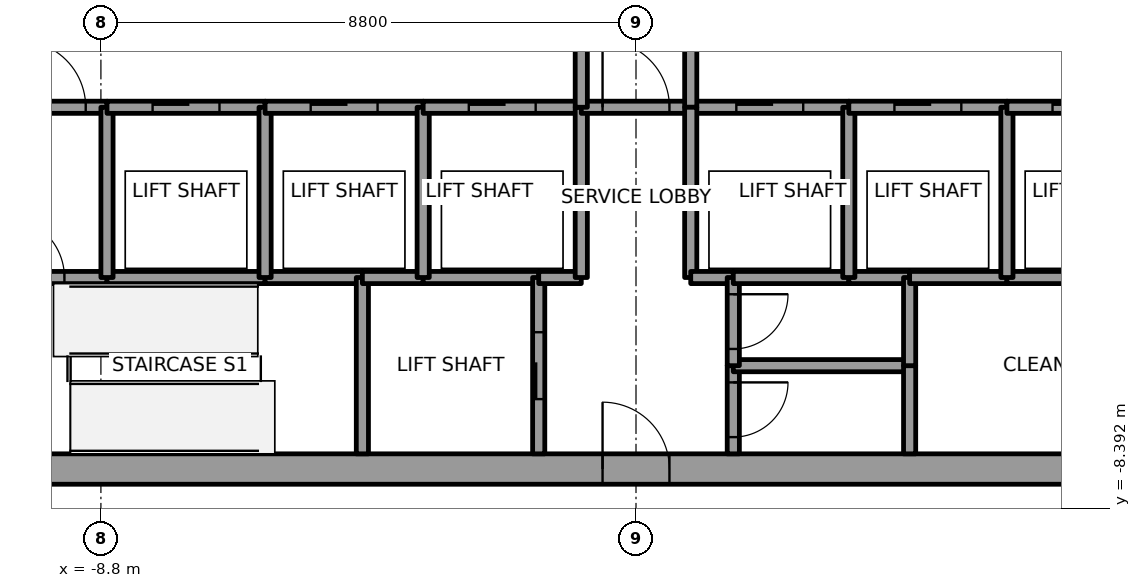
"""IFC4 building model, lengths in metres.
Left out: names, types, materials, properties, quantities, classifications, styles, units other than length and angle.
Written with IfcOpenShell. Run it as: python <this file> out.ifc"""

import sys

from ifc_helpers import new_model, si_unit, direction, frame, frame_2d, origin, place, context, subcontext, project, spatial, rectangle, extrude, element, fill, save


model = new_model("IFC4")
c1 = context("Model", 3, precision=1e-05, world=origin(), true_north=direction((0.0, 1.0)))
c2 = subcontext(c1, "Body", "Model", "MODEL_VIEW")
j1 = project(units=[si_unit("LENGTHUNIT", "METRE"), si_unit("PLANEANGLEUNIT", "RADIAN")], contexts=[c1])
p1 = place(None, origin())
s1 = spatial("IfcSite", under=j1, at=p1, CompositionType="ELEMENT")
p2 = place(p1, origin())
s2 = spatial("IfcBuilding", under=s1, at=p2, CompositionType="ELEMENT")
p3 = place(p2, frame((0.0, 0.0, 291.0)))
s3 = spatial("IfcBuildingStorey", under=s2, at=p3, CompositionType="ELEMENT", Elevation=291.0)
p4 = place(p3, frame((-11.0, -7.75, 0.0), z_axis=(0.0, 0.0, 1.0), x_axis=(1.0, 0.0, 0.0)))
e1 = element("IfcWall", 1, at=p4, inside=s3, PredefinedType="SHEAR", context=c2, shape_type="SweptSolid", body=[
    extrude(rectangle(XDim=22.0, YDim=0.5, at=frame_2d((11.0, 0.0))), origin(), (0.0, 0.0, 1.0), 4.0),
])
p5 = place(p4, frame((10.45, 0.0, 0.0)))
e2 = element("IfcOpeningElement", 2, at=p5, cuts=e1, PredefinedType="OPENING", context=c2, shape_type="SweptSolid", body=[
    extrude(rectangle(XDim=1.1, YDim=2.1, at=frame_2d((0.55, 1.05))), frame((0.0, 0.25, 0.0), z_axis=(0.0, -1.0, 0.0), x_axis=(1.0, 0.0, 0.0)), (0.0, 0.0, 1.0), 0.5),
])
p6 = place(p3, frame((-10.5, -4.6, 0.0), z_axis=(0.0, 0.0, 1.0), x_axis=(1.0, 0.0, 0.0)))
e3 = element("IfcWall", 3, at=p6, inside=s3, PredefinedType="SOLIDWALL", context=c2, shape_type="SweptSolid", body=[
    extrude(rectangle(XDim=1.8, YDim=0.2, at=frame_2d((0.9, 0.0))), origin(), (0.0, 0.0, 1.0), 3.85),
])
p7 = place(p6, frame((0.1, 0.0, 0.0)))
e4 = element("IfcOpeningElement", 4, at=p7, cuts=e3, PredefinedType="OPENING", context=c2, shape_type="SweptSolid", body=[
    extrude(rectangle(XDim=1.0, YDim=2.1, at=frame_2d((0.5, 1.05))), frame((0.0, 0.1, 0.0), z_axis=(0.0, -1.0, 0.0), x_axis=(1.0, 0.0, 0.0)), (0.0, 0.0, 1.0), 0.2),
])
p8 = place(p3, frame((-10.5, -1.8, 0.0), z_axis=(0.0, 0.0, 1.0), x_axis=(1.0, 0.0, 0.0)))
e5 = element("IfcWall", 5, at=p8, inside=s3, PredefinedType="SOLIDWALL", context=c2, shape_type="SweptSolid", body=[
    extrude(rectangle(XDim=1.8, YDim=0.2, at=frame_2d((0.9, 0.0))), origin(), (0.0, 0.0, 1.0), 3.85),
])
p9 = place(p8, frame((0.35, 0.0, 0.0)))
e6 = element("IfcOpeningElement", 6, at=p9, cuts=e5, PredefinedType="OPENING", context=c2, shape_type="SweptSolid", body=[
    extrude(rectangle(XDim=1.1, YDim=2.1, at=frame_2d((0.55, 1.05))), frame((0.0, 0.1, 0.0), z_axis=(0.0, -1.0, 0.0), x_axis=(1.0, 0.0, 0.0)), (0.0, 0.0, 1.0), 0.2),
])
p10 = place(p3, frame((-8.7, -4.6, 0.0), z_axis=(0.0, 0.0, 1.0), x_axis=(1.0, 0.0, 0.0)))
e7 = element("IfcWall", 7, at=p10, inside=s3, PredefinedType="SOLIDWALL", context=c2, shape_type="SweptSolid", body=[
    extrude(rectangle(XDim=2.6, YDim=0.2, at=frame_2d((1.3, 0.0))), origin(), (0.0, 0.0, 1.0), 3.85),
])
p11 = place(p3, frame((-8.7, -4.6, 0.0), z_axis=(0.0, 0.0, 1.0), x_axis=(0.0, 1.0, 0.0)))
e8 = element("IfcWall", 8, at=p11, inside=s3, PredefinedType="SOLIDWALL", context=c2, shape_type="SweptSolid", body=[
    extrude(rectangle(XDim=2.8, YDim=0.2, at=frame_2d((1.4, 0.0))), origin(), (0.0, 0.0, 1.0), 3.85),
])
p12 = place(p3, frame((-8.7, -1.8, 0.0), z_axis=(0.0, 0.0, 1.0), x_axis=(1.0, 0.0, 0.0)))
e9 = element("IfcWall", 9, at=p12, inside=s3, PredefinedType="SOLIDWALL", context=c2, shape_type="SweptSolid", body=[
    extrude(rectangle(XDim=2.6, YDim=0.2, at=frame_2d((1.3, 0.0))), origin(), (0.0, 0.0, 1.0), 3.85),
])
p13 = place(p12, frame((0.75, 0.0, 0.0)))
e10 = element("IfcOpeningElement", 10, at=p13, cuts=e9, PredefinedType="OPENING", context=c2, shape_type="SweptSolid", body=[
    extrude(rectangle(XDim=1.1, YDim=2.1, at=frame_2d((0.55, 1.05))), frame((0.0, 0.1, 0.0), z_axis=(0.0, -1.0, 0.0), x_axis=(1.0, 0.0, 0.0)), (0.0, 0.0, 1.0), 0.2),
])
p14 = place(p3, frame((-6.1, -4.6, 0.0), z_axis=(0.0, 0.0, 1.0), x_axis=(1.0, 0.0, 0.0)))
e11 = element("IfcWall", 11, at=p14, inside=s3, PredefinedType="SOLIDWALL", context=c2, shape_type="SweptSolid", body=[
    extrude(rectangle(XDim=1.6, YDim=0.2, at=frame_2d((0.8, 0.0))), origin(), (0.0, 0.0, 1.0), 3.85),
])
p15 = place(p3, frame((-6.1, -4.6, 0.0), z_axis=(0.0, 0.0, 1.0), x_axis=(0.0, 1.0, 0.0)))
e12 = element("IfcWall", 12, at=p15, inside=s3, PredefinedType="SOLIDWALL", context=c2, shape_type="SweptSolid", body=[
    extrude(rectangle(XDim=2.8, YDim=0.2, at=frame_2d((1.4, 0.0))), origin(), (0.0, 0.0, 1.0), 3.85),
])
p16 = place(p3, frame((-6.1, -1.8, 0.0), z_axis=(0.0, 0.0, 1.0), x_axis=(1.0, 0.0, 0.0)))
e13 = element("IfcWall", 13, at=p16, inside=s3, PredefinedType="SOLIDWALL", context=c2, shape_type="SweptSolid", body=[
    extrude(rectangle(XDim=2.6, YDim=0.2, at=frame_2d((1.3, 0.0))), origin(), (0.0, 0.0, 1.0), 3.85),
])
p17 = place(p16, frame((0.75, 0.0, 0.0)))
e14 = element("IfcOpeningElement", 14, at=p17, cuts=e13, PredefinedType="OPENING", context=c2, shape_type="SweptSolid", body=[
    extrude(rectangle(XDim=1.1, YDim=2.1, at=frame_2d((0.55, 1.05))), frame((0.0, 0.1, 0.0), z_axis=(0.0, -1.0, 0.0), x_axis=(1.0, 0.0, 0.0)), (0.0, 0.0, 1.0), 0.2),
])
p18 = place(p3, frame((-4.5, -4.6, 0.0), z_axis=(0.0, 0.0, 1.0), x_axis=(0.0, -1.0, 0.0)))
e15 = element("IfcWall", 15, at=p18, inside=s3, PredefinedType="SOLIDWALL", context=c2, shape_type="SweptSolid", body=[
    extrude(rectangle(XDim=2.9, YDim=0.2, at=frame_2d((1.45, 0.0))), origin(), (0.0, 0.0, 1.0), 3.85),
])
p19 = place(p3, frame((-4.5, -4.6, 0.0), z_axis=(0.0, 0.0, 1.0), x_axis=(1.0, 0.0, 0.0)))
e16 = element("IfcWall", 16, at=p19, inside=s3, PredefinedType="SOLIDWALL", context=c2, shape_type="SweptSolid", body=[
    extrude(rectangle(XDim=1.0, YDim=0.2, at=frame_2d((0.5, 0.0))), origin(), (0.0, 0.0, 1.0), 3.85),
])
p20 = place(p3, frame((-3.5, -4.6, 0.0), z_axis=(0.0, 0.0, 1.0), x_axis=(1.0, 0.0, 0.0)))
e17 = element("IfcWall", 17, at=p20, inside=s3, PredefinedType="SOLIDWALL", context=c2, shape_type="SweptSolid", body=[
    extrude(rectangle(XDim=1.9, YDim=0.2, at=frame_2d((0.95, 0.0))), origin(), (0.0, 0.0, 1.0), 3.85),
])
p21 = place(p3, frame((-3.5, -4.6, 0.0), z_axis=(0.0, 0.0, 1.0), x_axis=(0.0, 1.0, 0.0)))
e18 = element("IfcWall", 18, at=p21, inside=s3, PredefinedType="SOLIDWALL", context=c2, shape_type="SweptSolid", body=[
    extrude(rectangle(XDim=2.8, YDim=0.2, at=frame_2d((1.4, 0.0))), origin(), (0.0, 0.0, 1.0), 3.85),
])
p22 = place(p3, frame((-3.5, -1.8, 0.0), z_axis=(0.0, 0.0, 1.0), x_axis=(1.0, 0.0, 0.0)))
e19 = element("IfcWall", 19, at=p22, inside=s3, PredefinedType="SOLIDWALL", context=c2, shape_type="SweptSolid", body=[
    extrude(rectangle(XDim=2.6, YDim=0.2, at=frame_2d((1.3, 0.0))), origin(), (0.0, 0.0, 1.0), 3.85),
])
p23 = place(p22, frame((0.75, 0.0, 0.0)))
e20 = element("IfcOpeningElement", 20, at=p23, cuts=e19, PredefinedType="OPENING", context=c2, shape_type="SweptSolid", body=[
    extrude(rectangle(XDim=1.1, YDim=2.1, at=frame_2d((0.55, 1.05))), frame((0.0, 0.1, 0.0), z_axis=(0.0, -1.0, 0.0), x_axis=(1.0, 0.0, 0.0)), (0.0, 0.0, 1.0), 0.2),
])
p24 = place(p3, frame((-1.6, -7.5, 0.0), z_axis=(0.0, 0.0, 1.0), x_axis=(0.0, 1.0, 0.0)))
e21 = element("IfcWall", 21, at=p24, inside=s3, PredefinedType="SOLIDWALL", context=c2, shape_type="SweptSolid", body=[
    extrude(rectangle(XDim=2.9, YDim=0.2, at=frame_2d((1.45, 0.0))), origin(), (0.0, 0.0, 1.0), 3.85),
])
p25 = place(p24, frame((0.9, 0.0, 0.0)))
e22 = element("IfcOpeningElement", 22, at=p25, cuts=e21, PredefinedType="OPENING", context=c2, shape_type="SweptSolid", body=[
    extrude(rectangle(XDim=1.1, YDim=2.1, at=frame_2d((0.55, 1.05))), frame((0.0, 0.1, 0.0), z_axis=(0.0, -1.0, 0.0), x_axis=(1.0, 0.0, 0.0)), (0.0, 0.0, 1.0), 0.2),
])
p26 = place(p3, frame((-1.6, -4.6, 0.0), z_axis=(0.0, 0.0, 1.0), x_axis=(1.0, 0.0, 0.0)))
e23 = element("IfcWall", 23, at=p26, inside=s3, PredefinedType="SOLIDWALL", context=c2, shape_type="SweptSolid", body=[
    extrude(rectangle(XDim=0.7, YDim=0.2, at=frame_2d((0.35, 0.0))), origin(), (0.0, 0.0, 1.0), 3.85),
])
p27 = place(p3, frame((-0.9, -4.6, 0.0), z_axis=(0.0, 0.0, 1.0), x_axis=(0.0, 1.0, 0.0)))
e24 = element("IfcWall", 24, at=p27, inside=s3, PredefinedType="SOLIDWALL", context=c2, shape_type="SweptSolid", body=[
    extrude(rectangle(XDim=2.8, YDim=0.2, at=frame_2d((1.4, 0.0))), origin(), (0.0, 0.0, 1.0), 3.85),
])
p28 = place(p3, frame((-0.9, -1.8, 0.0), z_axis=(0.0, 0.0, 1.0), x_axis=(1.0, 0.0, 0.0)))
e25 = element("IfcWall", 25, at=p28, inside=s3, PredefinedType="SOLIDWALL", context=c2, shape_type="SweptSolid", body=[
    extrude(rectangle(XDim=1.8, YDim=0.2, at=frame_2d((0.9, 0.0))), origin(), (0.0, 0.0, 1.0), 3.85),
])
p29 = place(p28, frame((0.35, 0.0, 0.0)))
e26 = element("IfcOpeningElement", 26, at=p29, cuts=e25, PredefinedType="OPENING", context=c2, shape_type="SweptSolid", body=[
    extrude(rectangle(XDim=1.1, YDim=2.1, at=frame_2d((0.55, 1.05))), frame((0.0, 0.1, 0.0), z_axis=(0.0, -1.0, 0.0), x_axis=(1.0, 0.0, 0.0)), (0.0, 0.0, 1.0), 0.2),
])
p30 = place(p3, frame((-0.9, 1.8, 0.0), z_axis=(0.0, 0.0, 1.0), x_axis=(0.0, -1.0, 0.0)))
e27 = element("IfcWall", 27, at=p30, inside=s3, PredefinedType="SOLIDWALL", context=c2, shape_type="SweptSolid", body=[
    extrude(rectangle(XDim=3.6, YDim=0.2, at=frame_2d((1.8, 0.0))), origin(), (0.0, 0.0, 1.0), 3.85),
])
p31 = place(p30, frame((1.05, 0.0, 0.0)))
e28 = element("IfcOpeningElement", 28, at=p31, cuts=e27, PredefinedType="OPENING", context=c2, shape_type="SweptSolid", body=[
    extrude(rectangle(XDim=1.5, YDim=2.1, at=frame_2d((0.75, 1.05))), frame((0.0, 0.1, 0.0), z_axis=(0.0, -1.0, 0.0), x_axis=(1.0, 0.0, 0.0)), (0.0, 0.0, 1.0), 0.2),
])
p32 = place(p3, frame((0.9, -1.8, 0.0), z_axis=(0.0, 0.0, 1.0), x_axis=(1.0, 0.0, 0.0)))
e29 = element("IfcWall", 29, at=p32, inside=s3, PredefinedType="SOLIDWALL", context=c2, shape_type="SweptSolid", body=[
    extrude(rectangle(XDim=2.6, YDim=0.2, at=frame_2d((1.3, 0.0))), origin(), (0.0, 0.0, 1.0), 3.85),
])
p33 = place(p32, frame((0.75, 0.0, 0.0)))
e30 = element("IfcOpeningElement", 30, at=p33, cuts=e29, PredefinedType="OPENING", context=c2, shape_type="SweptSolid", body=[
    extrude(rectangle(XDim=1.1, YDim=2.1, at=frame_2d((0.55, 1.05))), frame((0.0, 0.1, 0.0), z_axis=(0.0, -1.0, 0.0), x_axis=(1.0, 0.0, 0.0)), (0.0, 0.0, 1.0), 0.2),
])
p34 = place(p3, frame((0.9, -1.8, 0.0), z_axis=(0.0, 0.0, 1.0), x_axis=(0.0, 1.0, 0.0)))
e31 = element("IfcWall", 31, at=p34, inside=s3, PredefinedType="SOLIDWALL", context=c2, shape_type="SweptSolid", body=[
    extrude(rectangle(XDim=3.6, YDim=0.2, at=frame_2d((1.8, 0.0))), origin(), (0.0, 0.0, 1.0), 3.85),
])
p35 = place(p34, frame((1.05, 0.0, 0.0)))
e32 = element("IfcOpeningElement", 32, at=p35, cuts=e31, PredefinedType="OPENING", context=c2, shape_type="SweptSolid", body=[
    extrude(rectangle(XDim=1.5, YDim=2.1, at=frame_2d((0.75, 1.05))), frame((0.0, 0.1, 0.0), z_axis=(0.0, -1.0, 0.0), x_axis=(1.0, 0.0, 0.0)), (0.0, 0.0, 1.0), 0.2),
])
p36 = place(p3, frame((0.9, -1.8, 0.0), z_axis=(0.0, 0.0, 1.0), x_axis=(0.0, -1.0, 0.0)))
e33 = element("IfcWall", 33, at=p36, inside=s3, PredefinedType="SOLIDWALL", context=c2, shape_type="SweptSolid", body=[
    extrude(rectangle(XDim=2.8, YDim=0.2, at=frame_2d((1.4, 0.0))), origin(), (0.0, 0.0, 1.0), 3.85),
])
p37 = place(p3, frame((0.9, -4.6, 0.0), z_axis=(0.0, 0.0, 1.0), x_axis=(1.0, 0.0, 0.0)))
e34 = element("IfcWall", 34, at=p37, inside=s3, PredefinedType="SOLIDWALL", context=c2, shape_type="SweptSolid", body=[
    extrude(rectangle(XDim=0.7, YDim=0.2, at=frame_2d((0.35, 0.0))), origin(), (0.0, 0.0, 1.0), 3.85),
])
p38 = place(p3, frame((1.6, -6.05, 0.0), z_axis=(0.0, 0.0, 1.0), x_axis=(0.0, -1.0, 0.0)))
e35 = element("IfcWall", 35, at=p38, inside=s3, PredefinedType="SOLIDWALL", context=c2, shape_type="SweptSolid", body=[
    extrude(rectangle(XDim=1.45, YDim=0.2, at=frame_2d((0.725, 0.0))), origin(), (0.0, 0.0, 1.0), 3.85),
])
p39 = place(p38, frame((0.275, 0.0, 0.0)))
e36 = element("IfcOpeningElement", 36, at=p39, cuts=e35, PredefinedType="OPENING", context=c2, shape_type="SweptSolid", body=[
    extrude(rectangle(XDim=0.9, YDim=2.1, at=frame_2d((0.45, 1.05))), frame((0.0, 0.1, 0.0), z_axis=(0.0, -1.0, 0.0), x_axis=(1.0, 0.0, 0.0)), (0.0, 0.0, 1.0), 0.2),
])
p40 = place(p3, frame((4.5, -6.05, 0.0), z_axis=(0.0, 0.0, 1.0), x_axis=(-1.0, 0.0, 0.0)))
e37 = element("IfcWall", 37, at=p40, inside=s3, PredefinedType="SOLIDWALL", context=c2, shape_type="SweptSolid", body=[
    extrude(rectangle(XDim=2.9, YDim=0.2, at=frame_2d((1.45, 0.0))), origin(), (0.0, 0.0, 1.0), 3.85),
])
p41 = place(p3, frame((1.6, -4.6, 0.0), z_axis=(0.0, 0.0, 1.0), x_axis=(0.0, -1.0, 0.0)))
e38 = element("IfcWall", 38, at=p41, inside=s3, PredefinedType="SOLIDWALL", context=c2, shape_type="SweptSolid", body=[
    extrude(rectangle(XDim=1.45, YDim=0.2, at=frame_2d((0.725, 0.0))), origin(), (0.0, 0.0, 1.0), 3.85),
])
p42 = place(p41, frame((0.275, 0.0, 0.0)))
e39 = element("IfcOpeningElement", 39, at=p42, cuts=e38, PredefinedType="OPENING", context=c2, shape_type="SweptSolid", body=[
    extrude(rectangle(XDim=0.9, YDim=2.1, at=frame_2d((0.45, 1.05))), frame((0.0, 0.1, 0.0), z_axis=(0.0, -1.0, 0.0), x_axis=(1.0, 0.0, 0.0)), (0.0, 0.0, 1.0), 0.2),
])
p43 = place(p3, frame((3.5, -4.6, 0.0), z_axis=(0.0, 0.0, 1.0), x_axis=(-1.0, 0.0, 0.0)))
e40 = element("IfcWall", 40, at=p43, inside=s3, PredefinedType="SOLIDWALL", context=c2, shape_type="SweptSolid", body=[
    extrude(rectangle(XDim=1.9, YDim=0.2, at=frame_2d((0.95, 0.0))), origin(), (0.0, 0.0, 1.0), 3.85),
])
p44 = place(p3, frame((4.5, -4.6, 0.0), z_axis=(0.0, 0.0, 1.0), x_axis=(-1.0, 0.0, 0.0)))
e41 = element("IfcWall", 41, at=p44, inside=s3, PredefinedType="SOLIDWALL", context=c2, shape_type="SweptSolid", body=[
    extrude(rectangle(XDim=1.0, YDim=0.2, at=frame_2d((0.5, 0.0))), origin(), (0.0, 0.0, 1.0), 3.85),
])
p45 = place(p3, frame((3.5, -4.6, 0.0), z_axis=(0.0, 0.0, 1.0), x_axis=(0.0, 1.0, 0.0)))
e42 = element("IfcWall", 42, at=p45, inside=s3, PredefinedType="SOLIDWALL", context=c2, shape_type="SweptSolid", body=[
    extrude(rectangle(XDim=2.8, YDim=0.2, at=frame_2d((1.4, 0.0))), origin(), (0.0, 0.0, 1.0), 3.85),
])
p46 = place(p3, frame((3.5, -1.8, 0.0), z_axis=(0.0, 0.0, 1.0), x_axis=(1.0, 0.0, 0.0)))
e43 = element("IfcWall", 43, at=p46, inside=s3, PredefinedType="SOLIDWALL", context=c2, shape_type="SweptSolid", body=[
    extrude(rectangle(XDim=2.6, YDim=0.2, at=frame_2d((1.3, 0.0))), origin(), (0.0, 0.0, 1.0), 3.85),
])
p47 = place(p46, frame((0.75, 0.0, 0.0)))
e44 = element("IfcOpeningElement", 44, at=p47, cuts=e43, PredefinedType="OPENING", context=c2, shape_type="SweptSolid", body=[
    extrude(rectangle(XDim=1.1, YDim=2.1, at=frame_2d((0.55, 1.05))), frame((0.0, 0.1, 0.0), z_axis=(0.0, -1.0, 0.0), x_axis=(1.0, 0.0, 0.0)), (0.0, 0.0, 1.0), 0.2),
])
for number, where, z_axis, x_axis in (
    (45, (4.5, -6.05, 0.0), (0.0, 0.0, 1.0), (0.0, -1.0, 0.0)),
    (46, (4.5, -4.6, 0.0), (0.0, 0.0, 1.0), (0.0, -1.0, 0.0)),
):
    element("IfcWall", number, at=place(p3, frame(where, z_axis=z_axis, x_axis=x_axis)), inside=s3, PredefinedType="SOLIDWALL", context=c2, shape_type="SweptSolid", body=[
        extrude(rectangle(XDim=1.45, YDim=0.2, at=frame_2d((0.725, 0.0))), origin(), (0.0, 0.0, 1.0), 3.85),
    ])
p48 = place(p3, frame((6.1, -4.6, 0.0), z_axis=(0.0, 0.0, 1.0), x_axis=(-1.0, 0.0, 0.0)))
e47 = element("IfcWall", 47, at=p48, inside=s3, PredefinedType="SOLIDWALL", context=c2, shape_type="SweptSolid", body=[
    extrude(rectangle(XDim=1.6, YDim=0.2, at=frame_2d((0.8, 0.0))), origin(), (0.0, 0.0, 1.0), 3.85),
])
p49 = place(p3, frame((8.7, -4.6, 0.0), z_axis=(0.0, 0.0, 1.0), x_axis=(-1.0, 0.0, 0.0)))
e48 = element("IfcWall", 48, at=p49, inside=s3, PredefinedType="SOLIDWALL", context=c2, shape_type="SweptSolid", body=[
    extrude(rectangle(XDim=2.6, YDim=0.2, at=frame_2d((1.3, 0.0))), origin(), (0.0, 0.0, 1.0), 3.85),
])
p50 = place(p3, frame((6.1, -4.6, 0.0), z_axis=(0.0, 0.0, 1.0), x_axis=(0.0, 1.0, 0.0)))
e49 = element("IfcWall", 49, at=p50, inside=s3, PredefinedType="SOLIDWALL", context=c2, shape_type="SweptSolid", body=[
    extrude(rectangle(XDim=2.8, YDim=0.2, at=frame_2d((1.4, 0.0))), origin(), (0.0, 0.0, 1.0), 3.85),
])
p51 = place(p3, frame((6.1, -1.8, 0.0), z_axis=(0.0, 0.0, 1.0), x_axis=(1.0, 0.0, 0.0)))
e50 = element("IfcWall", 50, at=p51, inside=s3, PredefinedType="SOLIDWALL", context=c2, shape_type="SweptSolid", body=[
    extrude(rectangle(XDim=2.6, YDim=0.2, at=frame_2d((1.3, 0.0))), origin(), (0.0, 0.0, 1.0), 3.85),
])
p52 = place(p51, frame((0.75, 0.0, 0.0)))
e51 = element("IfcOpeningElement", 51, at=p52, cuts=e50, PredefinedType="OPENING", context=c2, shape_type="SweptSolid", body=[
    extrude(rectangle(XDim=1.1, YDim=2.1, at=frame_2d((0.55, 1.05))), frame((0.0, 0.1, 0.0), z_axis=(0.0, -1.0, 0.0), x_axis=(1.0, 0.0, 0.0)), (0.0, 0.0, 1.0), 0.2),
])
p53 = place(p13, origin())
e52 = element("IfcDoor", 52, at=p53, inside=s3, OperationType="SLIDING_TO_LEFT", PredefinedType="DOOR", context=c2, shape_type="SweptSolid", body=[
    extrude(rectangle(XDim=1.1, YDim=2.1, at=frame_2d((0.55, 1.05))), frame((0.0, 0.025, 0.0), z_axis=(0.0, -1.0, 0.0), x_axis=(1.0, 0.0, 0.0)), (0.0, 0.0, 1.0), 0.05),
])
fill(e10, e52)
p54 = place(p17, origin())
e53 = element("IfcDoor", 53, at=p54, inside=s3, OperationType="SLIDING_TO_RIGHT", PredefinedType="DOOR", context=c2, shape_type="SweptSolid", body=[
    extrude(rectangle(XDim=1.1, YDim=2.1, at=frame_2d((0.55, 1.05))), frame((0.0, 0.025, 0.0), z_axis=(0.0, -1.0, 0.0), x_axis=(1.0, 0.0, 0.0)), (0.0, 0.0, 1.0), 0.05),
])
fill(e14, e53)
p55 = place(p23, origin())
e54 = element("IfcDoor", 54, at=p55, inside=s3, OperationType="SLIDING_TO_RIGHT", PredefinedType="DOOR", context=c2, shape_type="SweptSolid", body=[
    extrude(rectangle(XDim=1.1, YDim=2.1, at=frame_2d((0.55, 1.05))), frame((0.0, 0.025, 0.0), z_axis=(0.0, -1.0, 0.0), x_axis=(1.0, 0.0, 0.0)), (0.0, 0.0, 1.0), 0.05),
])
fill(e20, e54)
p56 = place(p33, origin())
e55 = element("IfcDoor", 55, at=p56, inside=s3, OperationType="SLIDING_TO_LEFT", PredefinedType="DOOR", context=c2, shape_type="SweptSolid", body=[
    extrude(rectangle(XDim=1.1, YDim=2.1, at=frame_2d((0.55, 1.05))), frame((0.0, 0.025, 0.0), z_axis=(0.0, -1.0, 0.0), x_axis=(1.0, 0.0, 0.0)), (0.0, 0.0, 1.0), 0.05),
])
fill(e30, e55)
p57 = place(p47, origin())
e56 = element("IfcDoor", 56, at=p57, inside=s3, OperationType="SLIDING_TO_LEFT", PredefinedType="DOOR", context=c2, shape_type="SweptSolid", body=[
    extrude(rectangle(XDim=1.1, YDim=2.1, at=frame_2d((0.55, 1.05))), frame((0.0, 0.025, 0.0), z_axis=(0.0, -1.0, 0.0), x_axis=(1.0, 0.0, 0.0)), (0.0, 0.0, 1.0), 0.05),
])
fill(e44, e56)
p58 = place(p52, origin())
e57 = element("IfcDoor", 57, at=p58, inside=s3, OperationType="SLIDING_TO_LEFT", PredefinedType="DOOR", context=c2, shape_type="SweptSolid", body=[
    extrude(rectangle(XDim=1.1, YDim=2.1, at=frame_2d((0.55, 1.05))), frame((0.0, 0.025, 0.0), z_axis=(0.0, -1.0, 0.0), x_axis=(1.0, 0.0, 0.0)), (0.0, 0.0, 1.0), 0.05),
])
fill(e51, e57)
p59 = place(p25, origin())
e58 = element("IfcDoor", 58, at=p59, inside=s3, OperationType="SLIDING_TO_RIGHT", PredefinedType="DOOR", context=c2, shape_type="SweptSolid", body=[
    extrude(rectangle(XDim=1.1, YDim=2.1, at=frame_2d((0.55, 1.05))), frame((0.0, 0.025, 0.0), z_axis=(0.0, -1.0, 0.0), x_axis=(1.0, 0.0, 0.0)), (0.0, 0.0, 1.0), 0.05),
])
fill(e22, e58)
p60 = place(p9, origin())
e59 = element("IfcDoor", 59, at=p60, inside=s3, OperationType="SINGLE_SWING_LEFT", PredefinedType="DOOR", context=c2, shape_type="SweptSolid", body=[
    extrude(rectangle(XDim=1.1, YDim=2.1, at=frame_2d((0.55, 1.05))), frame((0.0, 0.025, 0.0), z_axis=(0.0, -1.0, 0.0), x_axis=(1.0, 0.0, 0.0)), (0.0, 0.0, 1.0), 0.05),
])
fill(e6, e59)
p61 = place(p29, origin())
e60 = element("IfcDoor", 60, at=p61, inside=s3, OperationType="SINGLE_SWING_RIGHT", PredefinedType="DOOR", context=c2, shape_type="SweptSolid", body=[
    extrude(rectangle(XDim=1.1, YDim=2.1, at=frame_2d((0.55, 1.05))), frame((0.0, 0.025, 0.0), z_axis=(0.0, -1.0, 0.0), x_axis=(1.0, 0.0, 0.0)), (0.0, 0.0, 1.0), 0.05),
])
fill(e26, e60)
p62 = place(p7, origin())
e61 = element("IfcDoor", 61, at=p62, inside=s3, OperationType="SINGLE_SWING_LEFT", PredefinedType="DOOR", context=c2, shape_type="SweptSolid", body=[
    extrude(rectangle(XDim=1.0, YDim=2.1, at=frame_2d((0.5, 1.05))), frame((0.0, 0.025, 0.0), z_axis=(0.0, -1.0, 0.0), x_axis=(1.0, 0.0, 0.0)), (0.0, 0.0, 1.0), 0.05),
])
fill(e4, e61)
p63 = place(p39, origin())
e62 = element("IfcDoor", 62, at=p63, inside=s3, OperationType="SINGLE_SWING_LEFT", PredefinedType="DOOR", context=c2, shape_type="SweptSolid", body=[
    extrude(rectangle(XDim=0.9, YDim=2.1, at=frame_2d((0.45, 1.05))), frame((0.0, 0.025, 0.0), z_axis=(0.0, -1.0, 0.0), x_axis=(1.0, 0.0, 0.0)), (0.0, 0.0, 1.0), 0.05),
])
fill(e36, e62)
p64 = place(p42, origin())
e63 = element("IfcDoor", 63, at=p64, inside=s3, OperationType="SINGLE_SWING_LEFT", PredefinedType="DOOR", context=c2, shape_type="SweptSolid", body=[
    extrude(rectangle(XDim=0.9, YDim=2.1, at=frame_2d((0.45, 1.05))), frame((0.0, 0.025, 0.0), z_axis=(0.0, -1.0, 0.0), x_axis=(1.0, 0.0, 0.0)), (0.0, 0.0, 1.0), 0.05),
])
fill(e39, e63)
p65 = place(p5, origin())
e64 = element("IfcDoor", 64, at=p65, inside=s3, OperationType="SINGLE_SWING_RIGHT", PredefinedType="DOOR", context=c2, shape_type="SweptSolid", body=[
    extrude(rectangle(XDim=1.1, YDim=2.1, at=frame_2d((0.55, 1.05))), frame((0.0, 0.025, 0.0), z_axis=(0.0, -1.0, 0.0), x_axis=(1.0, 0.0, 0.0)), (0.0, 0.0, 1.0), 0.05),
])
fill(e2, e64)
save(model, sys.argv[1])
